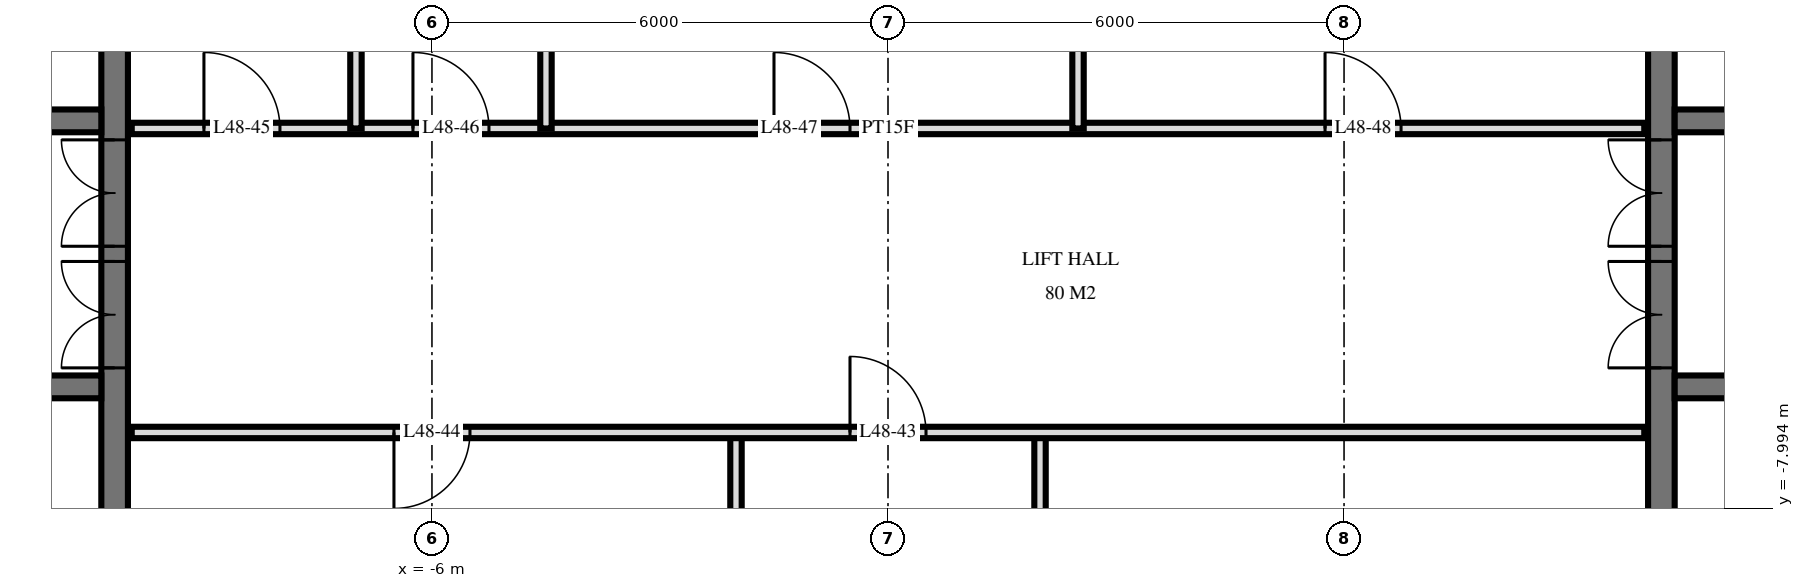
"""IFC4 building model, lengths in metres.
Left out: names, types, materials, properties, quantities, classifications, styles, units other than length and angle.
Written with IfcOpenShell. Run it as: python <this file> out.ifc"""

import sys

from ifc_helpers import new_model, si_unit, direction, frame, frame_2d, origin, place, context, subcontext, project, spatial, rectangle, extrude, element, fill, save


model = new_model("IFC4")
c1 = context("Model", 3, precision=1e-05, world=origin(), true_north=direction((0.0, 1.0)))
c2 = subcontext(c1, "Body", "Model", "MODEL_VIEW")
j1 = project(units=[si_unit("LENGTHUNIT", "METRE"), si_unit("PLANEANGLEUNIT", "RADIAN")], contexts=[c1])
p1 = place(None, origin())
s1 = spatial("IfcSite", under=j1, at=p1, CompositionType="ELEMENT")
p2 = place(p1, origin())
s2 = spatial("IfcBuilding", under=s1, at=p2, CompositionType="ELEMENT")
p3 = place(p2, frame((0.0, 0.0, 187.1)))
s3 = spatial("IfcBuildingStorey", under=s2, at=p3, CompositionType="ELEMENT", Elevation=187.1)
p4 = place(p3, frame((-10.175, -14.55, 0.0), z_axis=(0.0, 0.0, 1.0), x_axis=(0.0, 1.0, 0.0)))
e1 = element("IfcWall", 1, at=p4, inside=s3, PredefinedType="SHEAR", context=c2, shape_type="SweptSolid", body=[
    extrude(rectangle(XDim=14.1, YDim=0.35, at=frame_2d((7.05, 0.0))), origin(), (0.0, 0.0, 1.0), 3.5),
])
p5 = place(p4, frame((8.4, 0.0, 0.0)))
e2 = element("IfcOpeningElement", 2, at=p5, cuts=e1, PredefinedType="OPENING", context=c2, shape_type="SweptSolid", body=[
    extrude(rectangle(XDim=1.4, YDim=2.4, at=frame_2d((0.7, 1.2))), frame((0.0, 0.185, 0.0), z_axis=(0.0, -1.0, 0.0), x_axis=(1.0, 0.0, 0.0)), (0.0, 0.0, 1.0), 0.37),
])
p6 = place(p4, frame((10.0, 0.0, 0.0)))
e3 = element("IfcOpeningElement", 3, at=p6, cuts=e1, PredefinedType="OPENING", context=c2, shape_type="SweptSolid", body=[
    extrude(rectangle(XDim=1.4, YDim=2.4, at=frame_2d((0.7, 1.2))), frame((0.0, 0.185, 0.0), z_axis=(0.0, -1.0, 0.0), x_axis=(1.0, 0.0, 0.0)), (0.0, 0.0, 1.0), 0.37),
])
p7 = place(p4, frame((4.0, 0.0, 0.0)))
e4 = element("IfcOpeningElement", 4, at=p7, cuts=e1, PredefinedType="OPENING", context=c2, shape_type="SweptSolid", body=[
    extrude(rectangle(XDim=1.2, YDim=2.1, at=frame_2d((0.6, 1.05))), frame((0.0, 0.185, 0.0), z_axis=(0.0, -1.0, 0.0), x_axis=(1.0, 0.0, 0.0)), (0.0, 0.0, 1.0), 0.37),
])
p8 = place(p3, frame((-24.05, -2.9, 0.0), z_axis=(0.0, 0.0, 1.0), x_axis=(1.0, 0.0, 0.0)))
e5 = element("IfcWall", 5, at=p8, inside=s3, PredefinedType="SHEAR", context=c2, shape_type="SweptSolid", body=[
    extrude(rectangle(XDim=13.7, YDim=0.3, at=frame_2d((6.85, 0.0))), origin(), (0.0, 0.0, 1.0), 3.5),
])
p9 = place(p8, frame((0.55, 0.0, 0.0)))
e6 = element("IfcOpeningElement", 6, at=p9, cuts=e5, PredefinedType="OPENING", context=c2, shape_type="SweptSolid", body=[
    extrude(rectangle(XDim=1.1, YDim=2.1, at=frame_2d((0.55, 1.05))), frame((0.0, 0.16, 0.0), z_axis=(0.0, -1.0, 0.0), x_axis=(1.0, 0.0, 0.0)), (0.0, 0.0, 1.0), 0.32),
])
p10 = place(p8, frame((5.9, 0.0, 0.0)))
e7 = element("IfcOpeningElement", 7, at=p10, cuts=e5, PredefinedType="OPENING", context=c2, shape_type="SweptSolid", body=[
    extrude(rectangle(XDim=0.9, YDim=2.1, at=frame_2d((0.45, 1.05))), frame((0.0, 0.16, 0.0), z_axis=(0.0, -1.0, 0.0), x_axis=(1.0, 0.0, 0.0)), (0.0, 0.0, 1.0), 0.32),
])
p11 = place(p8, frame((11.85, 0.0, 0.0)))
e8 = element("IfcOpeningElement", 8, at=p11, cuts=e5, PredefinedType="OPENING", context=c2, shape_type="SweptSolid", body=[
    extrude(rectangle(XDim=1.0, YDim=2.1, at=frame_2d((0.5, 1.05))), frame((0.0, 0.16, 0.0), z_axis=(0.0, -1.0, 0.0), x_axis=(1.0, 0.0, 0.0)), (0.0, 0.0, 1.0), 0.32),
])
p12 = place(p8, frame((8.85, 0.0, 0.0)))
e9 = element("IfcOpeningElement", 9, at=p12, cuts=e5, PredefinedType="OPENING", context=c2, shape_type="SweptSolid", body=[
    extrude(rectangle(XDim=1.0, YDim=2.1, at=frame_2d((0.5, 1.05))), frame((0.0, 0.16, 0.0), z_axis=(0.0, -1.0, 0.0), x_axis=(1.0, 0.0, 0.0)), (0.0, 0.0, 1.0), 0.32),
])
p13 = place(p8, frame((3.0, 0.0, 0.0)))
e10 = element("IfcOpeningElement", 10, at=p13, cuts=e5, PredefinedType="OPENING", context=c2, shape_type="SweptSolid", body=[
    extrude(rectangle(XDim=1.0, YDim=2.1, at=frame_2d((0.5, 1.05))), frame((0.0, 0.16, 0.0), z_axis=(0.0, -1.0, 0.0), x_axis=(1.0, 0.0, 0.0)), (0.0, 0.0, 1.0), 0.32),
])
p14 = place(p3, frame((-24.05, -6.4, 0.0), z_axis=(0.0, 0.0, 1.0), x_axis=(1.0, 0.0, 0.0)))
e11 = element("IfcWall", 11, at=p14, inside=s3, PredefinedType="SHEAR", context=c2, shape_type="SweptSolid", body=[
    extrude(rectangle(XDim=13.7, YDim=0.3, at=frame_2d((6.85, 0.0))), origin(), (0.0, 0.0, 1.0), 3.5),
])
p15 = place(p14, frame((0.55, 0.0, 0.0)))
e12 = element("IfcOpeningElement", 12, at=p15, cuts=e11, PredefinedType="OPENING", context=c2, shape_type="SweptSolid", body=[
    extrude(rectangle(XDim=1.1, YDim=2.1, at=frame_2d((0.55, 1.05))), frame((0.0, 0.16, 0.0), z_axis=(0.0, -1.0, 0.0), x_axis=(1.0, 0.0, 0.0)), (0.0, 0.0, 1.0), 0.32),
])
p16 = place(p14, frame((5.8, 0.0, 0.0)))
e13 = element("IfcOpeningElement", 13, at=p16, cuts=e11, PredefinedType="OPENING", context=c2, shape_type="SweptSolid", body=[
    extrude(rectangle(XDim=1.1, YDim=2.1, at=frame_2d((0.55, 1.05))), frame((0.0, 0.16, 0.0), z_axis=(0.0, -1.0, 0.0), x_axis=(1.0, 0.0, 0.0)), (0.0, 0.0, 1.0), 0.32),
])
p17 = place(p3, frame((10.175, -14.55, 0.0), z_axis=(0.0, 0.0, 1.0), x_axis=(0.0, 1.0, 0.0)))
e14 = element("IfcWall", 14, at=p17, inside=s3, PredefinedType="SHEAR", context=c2, shape_type="SweptSolid", body=[
    extrude(rectangle(XDim=14.1, YDim=0.35, at=frame_2d((7.05, 0.0))), origin(), (0.0, 0.0, 1.0), 3.5),
])
p18 = place(p17, frame((8.4, 0.0, 0.0)))
e15 = element("IfcOpeningElement", 15, at=p18, cuts=e14, PredefinedType="OPENING", context=c2, shape_type="SweptSolid", body=[
    extrude(rectangle(XDim=1.4, YDim=2.4, at=frame_2d((0.7, 1.2))), frame((0.0, 0.185, 0.0), z_axis=(0.0, -1.0, 0.0), x_axis=(1.0, 0.0, 0.0)), (0.0, 0.0, 1.0), 0.37),
])
p19 = place(p17, frame((10.0, 0.0, 0.0)))
e16 = element("IfcOpeningElement", 16, at=p19, cuts=e14, PredefinedType="OPENING", context=c2, shape_type="SweptSolid", body=[
    extrude(rectangle(XDim=1.4, YDim=2.4, at=frame_2d((0.7, 1.2))), frame((0.0, 0.185, 0.0), z_axis=(0.0, -1.0, 0.0), x_axis=(1.0, 0.0, 0.0)), (0.0, 0.0, 1.0), 0.37),
])
p20 = place(p17, frame((4.0, 0.0, 0.0)))
e17 = element("IfcOpeningElement", 17, at=p20, cuts=e14, PredefinedType="OPENING", context=c2, shape_type="SweptSolid", body=[
    extrude(rectangle(XDim=1.2, YDim=2.1, at=frame_2d((0.6, 1.05))), frame((0.0, 0.185, 0.0), z_axis=(0.0, -1.0, 0.0), x_axis=(1.0, 0.0, 0.0)), (0.0, 0.0, 1.0), 0.37),
])
p21 = place(p3, frame((10.35, -2.9, 0.0), z_axis=(0.0, 0.0, 1.0), x_axis=(1.0, 0.0, 0.0)))
e18 = element("IfcWall", 18, at=p21, inside=s3, PredefinedType="SHEAR", context=c2, shape_type="SweptSolid", body=[
    extrude(rectangle(XDim=13.7, YDim=0.3, at=frame_2d((6.85, 0.0))), origin(), (0.0, 0.0, 1.0), 3.5),
])
p22 = place(p21, frame((12.05, 0.0, 0.0)))
e19 = element("IfcOpeningElement", 19, at=p22, cuts=e18, PredefinedType="OPENING", context=c2, shape_type="SweptSolid", body=[
    extrude(rectangle(XDim=1.1, YDim=2.1, at=frame_2d((0.55, 1.05))), frame((0.0, 0.16, 0.0), z_axis=(0.0, -1.0, 0.0), x_axis=(1.0, 0.0, 0.0)), (0.0, 0.0, 1.0), 0.32),
])
p23 = place(p21, frame((6.9, 0.0, 0.0)))
e20 = element("IfcOpeningElement", 20, at=p23, cuts=e18, PredefinedType="OPENING", context=c2, shape_type="SweptSolid", body=[
    extrude(rectangle(XDim=0.9, YDim=2.1, at=frame_2d((0.45, 1.05))), frame((0.0, 0.16, 0.0), z_axis=(0.0, -1.0, 0.0), x_axis=(1.0, 0.0, 0.0)), (0.0, 0.0, 1.0), 0.32),
])
p24 = place(p21, frame((0.85, 0.0, 0.0)))
e21 = element("IfcOpeningElement", 21, at=p24, cuts=e18, PredefinedType="OPENING", context=c2, shape_type="SweptSolid", body=[
    extrude(rectangle(XDim=1.0, YDim=2.1, at=frame_2d((0.5, 1.05))), frame((0.0, 0.16, 0.0), z_axis=(0.0, -1.0, 0.0), x_axis=(1.0, 0.0, 0.0)), (0.0, 0.0, 1.0), 0.32),
])
p25 = place(p21, frame((3.85, 0.0, 0.0)))
e22 = element("IfcOpeningElement", 22, at=p25, cuts=e18, PredefinedType="OPENING", context=c2, shape_type="SweptSolid", body=[
    extrude(rectangle(XDim=1.0, YDim=2.1, at=frame_2d((0.5, 1.05))), frame((0.0, 0.16, 0.0), z_axis=(0.0, -1.0, 0.0), x_axis=(1.0, 0.0, 0.0)), (0.0, 0.0, 1.0), 0.32),
])
p26 = place(p21, frame((9.7, 0.0, 0.0)))
e23 = element("IfcOpeningElement", 23, at=p26, cuts=e18, PredefinedType="OPENING", context=c2, shape_type="SweptSolid", body=[
    extrude(rectangle(XDim=1.0, YDim=2.1, at=frame_2d((0.5, 1.05))), frame((0.0, 0.16, 0.0), z_axis=(0.0, -1.0, 0.0), x_axis=(1.0, 0.0, 0.0)), (0.0, 0.0, 1.0), 0.32),
])
p27 = place(p3, frame((10.35, -6.4, 0.0), z_axis=(0.0, 0.0, 1.0), x_axis=(1.0, 0.0, 0.0)))
e24 = element("IfcWall", 24, at=p27, inside=s3, PredefinedType="SHEAR", context=c2, shape_type="SweptSolid", body=[
    extrude(rectangle(XDim=13.7, YDim=0.3, at=frame_2d((6.85, 0.0))), origin(), (0.0, 0.0, 1.0), 3.5),
])
p28 = place(p27, frame((12.05, 0.0, 0.0)))
e25 = element("IfcOpeningElement", 25, at=p28, cuts=e24, PredefinedType="OPENING", context=c2, shape_type="SweptSolid", body=[
    extrude(rectangle(XDim=1.1, YDim=2.1, at=frame_2d((0.55, 1.05))), frame((0.0, 0.16, 0.0), z_axis=(0.0, -1.0, 0.0), x_axis=(1.0, 0.0, 0.0)), (0.0, 0.0, 1.0), 0.32),
])
p29 = place(p27, frame((6.8, 0.0, 0.0)))
e26 = element("IfcOpeningElement", 26, at=p29, cuts=e24, PredefinedType="OPENING", context=c2, shape_type="SweptSolid", body=[
    extrude(rectangle(XDim=1.1, YDim=2.1, at=frame_2d((0.55, 1.05))), frame((0.0, 0.16, 0.0), z_axis=(0.0, -1.0, 0.0), x_axis=(1.0, 0.0, 0.0)), (0.0, 0.0, 1.0), 0.32),
])
p30 = place(p3, frame((2.5, -3.0, 0.0), z_axis=(0.0, 0.0, 1.0), x_axis=(0.0, 1.0, 0.0)))
e27 = element("IfcWall", 27, at=p30, inside=s3, PredefinedType="PARTITIONING", context=c2, shape_type="SweptSolid", body=[
    extrude(rectangle(XDim=4.02, YDim=0.15, at=frame_2d((2.01, 0.0))), origin(), (0.0, 0.0, 1.0), 3.22),
])
for number, where, z_axis, x_axis in (
    (28, (2.0, -11.0, 0.0), (0.0, 0.0, 1.0), (0.0, 1.0, 0.0)),
    (29, (-2.0, -11.0, 0.0), (0.0, 0.0, 1.0), (0.0, 1.0, 0.0)),
):
    element("IfcWall", number, at=place(p3, frame(where, z_axis=z_axis, x_axis=x_axis)), inside=s3, PredefinedType="PARTITIONING", context=c2, shape_type="SweptSolid", body=[
        extrude(rectangle(XDim=4.0, YDim=0.15, at=frame_2d((2.0, 0.0))), origin(), (0.0, 0.0, 1.0), 3.22),
    ])
for number, where, z_axis, x_axis in (
    (30, (-4.5, -3.0, 0.0), (0.0, 0.0, 1.0), (0.0, 1.0, 0.0)),
    (31, (-7.0, -3.0, 0.0), (0.0, 0.0, 1.0), (0.0, 1.0, 0.0)),
):
    element("IfcWall", number, at=place(p3, frame(where, z_axis=z_axis, x_axis=x_axis)), inside=s3, PredefinedType="PLUMBINGWALL", context=c2, shape_type="SweptSolid", body=[
        extrude(rectangle(XDim=4.02, YDim=0.15, at=frame_2d((2.01, 0.0))), origin(), (0.0, 0.0, 1.0), 3.22),
    ])
p31 = place(p3, frame((-9.95, -7.0, 0.0), z_axis=(0.0, 0.0, 1.0), x_axis=(1.0, 0.0, 0.0)))
e32 = element("IfcWall", 32, at=p31, inside=s3, PredefinedType="PARTITIONING", context=c2, shape_type="SweptSolid", body=[
    extrude(rectangle(XDim=19.9, YDim=0.15, at=frame_2d((9.95, 0.0))), origin(), (0.0, 0.0, 1.0), 3.22),
])
p32 = place(p31, frame((9.45, 0.0, 0.0)))
e33 = element("IfcOpeningElement", 33, at=p32, cuts=e32, PredefinedType="OPENING", context=c2, shape_type="SweptSolid", body=[
    extrude(rectangle(XDim=1.0, YDim=2.1, at=frame_2d((0.5, 1.05))), frame((0.0, 0.085, 0.0), z_axis=(0.0, -1.0, 0.0), x_axis=(1.0, 0.0, 0.0)), (0.0, 0.0, 1.0), 0.17),
])
p33 = place(p31, frame((3.45, 0.0, 0.0)))
e34 = element("IfcOpeningElement", 34, at=p33, cuts=e32, PredefinedType="OPENING", context=c2, shape_type="SweptSolid", body=[
    extrude(rectangle(XDim=1.0, YDim=2.1, at=frame_2d((0.5, 1.05))), frame((0.0, 0.085, 0.0), z_axis=(0.0, -1.0, 0.0), x_axis=(1.0, 0.0, 0.0)), (0.0, 0.0, 1.0), 0.17),
])
p34 = place(p3, frame((-9.95, -3.0, 0.0), z_axis=(0.0, 0.0, 1.0), x_axis=(1.0, 0.0, 0.0)))
e35 = element("IfcWall", 35, at=p34, inside=s3, PredefinedType="PARTITIONING", context=c2, shape_type="SweptSolid", body=[
    extrude(rectangle(XDim=19.9, YDim=0.15, at=frame_2d((9.95, 0.0))), origin(), (0.0, 0.0, 1.0), 3.22),
])
p35 = place(p34, frame((0.95, 0.0, 0.0)))
e36 = element("IfcOpeningElement", 36, at=p35, cuts=e35, PredefinedType="OPENING", context=c2, shape_type="SweptSolid", body=[
    extrude(rectangle(XDim=1.0, YDim=2.1, at=frame_2d((0.5, 1.05))), frame((0.0, 0.085, 0.0), z_axis=(0.0, -1.0, 0.0), x_axis=(1.0, 0.0, 0.0)), (0.0, 0.0, 1.0), 0.17),
])
p36 = place(p34, frame((3.7, 0.0, 0.0)))
e37 = element("IfcOpeningElement", 37, at=p36, cuts=e35, PredefinedType="OPENING", context=c2, shape_type="SweptSolid", body=[
    extrude(rectangle(XDim=1.0, YDim=2.1, at=frame_2d((0.5, 1.05))), frame((0.0, 0.085, 0.0), z_axis=(0.0, -1.0, 0.0), x_axis=(1.0, 0.0, 0.0)), (0.0, 0.0, 1.0), 0.17),
])
p37 = place(p34, frame((8.45, 0.0, 0.0)))
e38 = element("IfcOpeningElement", 38, at=p37, cuts=e35, PredefinedType="OPENING", context=c2, shape_type="SweptSolid", body=[
    extrude(rectangle(XDim=1.0, YDim=2.1, at=frame_2d((0.5, 1.05))), frame((0.0, 0.085, 0.0), z_axis=(0.0, -1.0, 0.0), x_axis=(1.0, 0.0, 0.0)), (0.0, 0.0, 1.0), 0.17),
])
p38 = place(p34, frame((15.7, 0.0, 0.0)))
e39 = element("IfcOpeningElement", 39, at=p38, cuts=e35, PredefinedType="OPENING", context=c2, shape_type="SweptSolid", body=[
    extrude(rectangle(XDim=1.0, YDim=2.1, at=frame_2d((0.5, 1.05))), frame((0.0, 0.085, 0.0), z_axis=(0.0, -1.0, 0.0), x_axis=(1.0, 0.0, 0.0)), (0.0, 0.0, 1.0), 0.17),
])
p39 = place(p5, origin())
e40 = element("IfcDoor", 40, at=p39, inside=s3, OperationType="DOUBLE_DOOR_SINGLE_SWING", PredefinedType="DOOR", context=c2, shape_type="SweptSolid", body=[
    extrude(rectangle(XDim=1.4, YDim=2.4, at=frame_2d((0.7, 1.2))), frame((0.0, 0.025, 0.0), z_axis=(0.0, -1.0, 0.0), x_axis=(1.0, 0.0, 0.0)), (0.0, 0.0, 1.0), 0.05),
])
fill(e2, e40)
p40 = place(p6, origin())
e41 = element("IfcDoor", 41, at=p40, inside=s3, OperationType="DOUBLE_DOOR_SINGLE_SWING", PredefinedType="DOOR", context=c2, shape_type="SweptSolid", body=[
    extrude(rectangle(XDim=1.4, YDim=2.4, at=frame_2d((0.7, 1.2))), frame((0.0, 0.025, 0.0), z_axis=(0.0, -1.0, 0.0), x_axis=(1.0, 0.0, 0.0)), (0.0, 0.0, 1.0), 0.05),
])
fill(e3, e41)
p41 = place(p18, origin())
e42 = element("IfcDoor", 42, at=p41, inside=s3, OperationType="DOUBLE_DOOR_SINGLE_SWING", PredefinedType="DOOR", context=c2, shape_type="SweptSolid", body=[
    extrude(rectangle(XDim=1.4, YDim=2.4, at=frame_2d((0.7, 1.2))), frame((0.0, 0.025, 0.0), z_axis=(0.0, -1.0, 0.0), x_axis=(1.0, 0.0, 0.0)), (0.0, 0.0, 1.0), 0.05),
])
fill(e15, e42)
p42 = place(p19, origin())
e43 = element("IfcDoor", 43, at=p42, inside=s3, OperationType="DOUBLE_DOOR_SINGLE_SWING", PredefinedType="DOOR", context=c2, shape_type="SweptSolid", body=[
    extrude(rectangle(XDim=1.4, YDim=2.4, at=frame_2d((0.7, 1.2))), frame((0.0, 0.025, 0.0), z_axis=(0.0, -1.0, 0.0), x_axis=(1.0, 0.0, 0.0)), (0.0, 0.0, 1.0), 0.05),
])
fill(e16, e43)
p43 = place(p32, origin())
e44 = element("IfcDoor", 44, at=p43, inside=s3, OperationType="SINGLE_SWING_RIGHT", PredefinedType="DOOR", context=c2, shape_type="SweptSolid", body=[
    extrude(rectangle(XDim=1.0, YDim=2.1, at=frame_2d((0.5, 1.05))), frame((0.0, 0.025, 0.0), z_axis=(0.0, -1.0, 0.0), x_axis=(1.0, 0.0, 0.0)), (0.0, 0.0, 1.0), 0.05),
])
fill(e33, e44)
p44 = place(p33, frame((0.5, 0.0, 0.0), z_axis=(0.0, 0.0, 1.0), x_axis=(-1.0, 0.0, 0.0)))
e45 = element("IfcDoor", 45, at=p44, inside=s3, OperationType="SINGLE_SWING_LEFT", PredefinedType="DOOR", context=c2, shape_type="SweptSolid", body=[
    extrude(rectangle(XDim=1.0, YDim=2.1, at=frame_2d((0.0, 1.05))), frame((0.0, -0.025, 0.0), z_axis=(0.0, 1.0, 0.0), x_axis=(-1.0, 0.0, 0.0)), (0.0, 0.0, 1.0), 0.05),
])
fill(e34, e45)
p45 = place(p35, origin())
e46 = element("IfcDoor", 46, at=p45, inside=s3, OperationType="SINGLE_SWING_RIGHT", PredefinedType="DOOR", context=c2, shape_type="SweptSolid", body=[
    extrude(rectangle(XDim=1.0, YDim=2.1, at=frame_2d((0.5, 1.05))), frame((0.0, 0.025, 0.0), z_axis=(0.0, -1.0, 0.0), x_axis=(1.0, 0.0, 0.0)), (0.0, 0.0, 1.0), 0.05),
])
fill(e36, e46)
p46 = place(p36, origin())
e47 = element("IfcDoor", 47, at=p46, inside=s3, OperationType="SINGLE_SWING_RIGHT", PredefinedType="DOOR", context=c2, shape_type="SweptSolid", body=[
    extrude(rectangle(XDim=1.0, YDim=2.1, at=frame_2d((0.5, 1.05))), frame((0.0, 0.025, 0.0), z_axis=(0.0, -1.0, 0.0), x_axis=(1.0, 0.0, 0.0)), (0.0, 0.0, 1.0), 0.05),
])
fill(e37, e47)
p47 = place(p37, origin())
e48 = element("IfcDoor", 48, at=p47, inside=s3, OperationType="SINGLE_SWING_RIGHT", PredefinedType="DOOR", context=c2, shape_type="SweptSolid", body=[
    extrude(rectangle(XDim=1.0, YDim=2.1, at=frame_2d((0.5, 1.05))), frame((0.0, 0.025, 0.0), z_axis=(0.0, -1.0, 0.0), x_axis=(1.0, 0.0, 0.0)), (0.0, 0.0, 1.0), 0.05),
])
fill(e38, e48)
p48 = place(p38, origin())
e49 = element("IfcDoor", 49, at=p48, inside=s3, OperationType="SINGLE_SWING_RIGHT", PredefinedType="DOOR", context=c2, shape_type="SweptSolid", body=[
    extrude(rectangle(XDim=1.0, YDim=2.1, at=frame_2d((0.5, 1.05))), frame((0.0, 0.025, 0.0), z_axis=(0.0, -1.0, 0.0), x_axis=(1.0, 0.0, 0.0)), (0.0, 0.0, 1.0), 0.05),
])
fill(e39, e49)
save(model, sys.argv[1])
